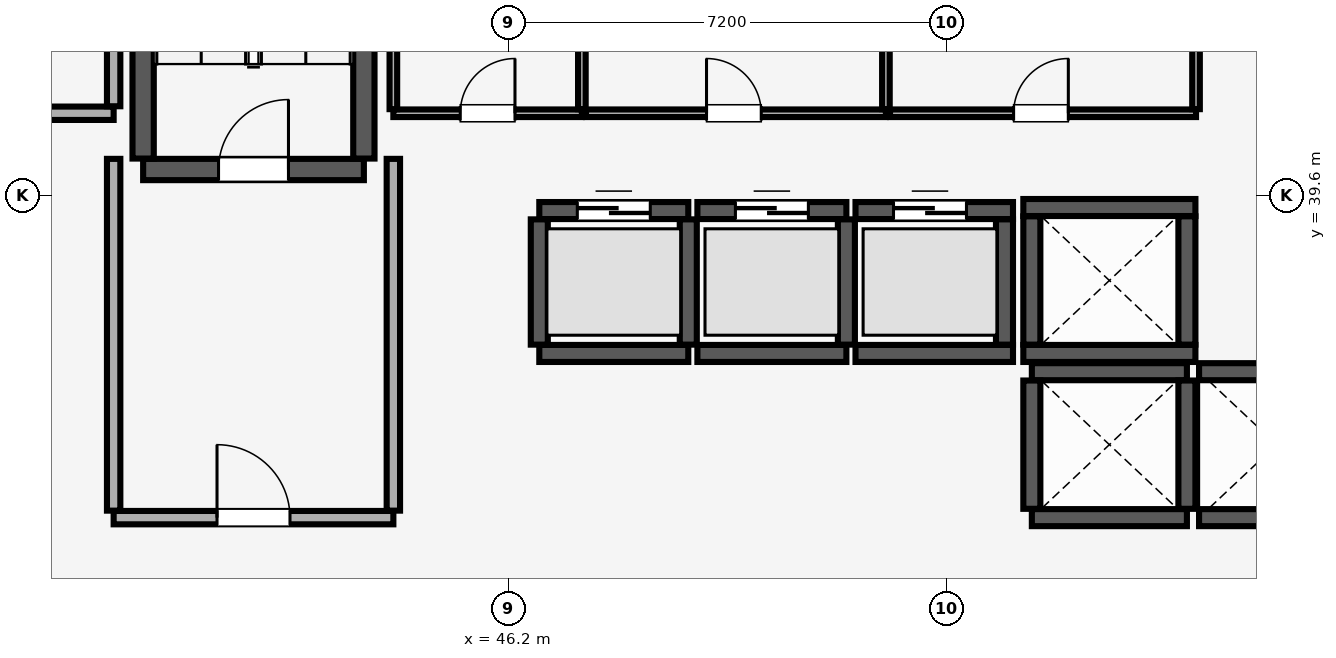
"""IFC4 building model, lengths in metres.
Left out: names, types, materials, properties, quantities, classifications, styles, units other than length and angle.
Written with IfcOpenShell. Run it as: python <this file> out.ifc"""

import sys

from ifc_helpers import new_model, si_unit, direction, frame, frame_2d, origin, place, context, subcontext, project, spatial, rectangle, extrude, element, fill, save


model = new_model("IFC4")
c1 = context("Model", 3, precision=1e-05, world=origin(), true_north=direction((0.0, 1.0)))
c2 = subcontext(c1, "Body", "Model", "MODEL_VIEW")
j1 = project(units=[si_unit("LENGTHUNIT", "METRE"), si_unit("PLANEANGLEUNIT", "RADIAN")], contexts=[c1])
p1 = place(None, origin())
s1 = spatial("IfcSite", under=j1, at=p1, CompositionType="ELEMENT")
p2 = place(p1, origin())
s2 = spatial("IfcBuilding", under=s1, at=p2, CompositionType="ELEMENT")
p3 = place(p2, frame((0.0, 0.0, 8.0)))
s3 = spatial("IfcBuildingStorey", under=s2, at=p3, CompositionType="ELEMENT", Elevation=8.0)
p4 = place(p3, frame((40.185, 40.025, 0.0), z_axis=(0.0, 0.0, 1.0), x_axis=(1.0, 0.0, 0.0)))
e1 = element("IfcWall", 1, at=p4, inside=s3, PredefinedType="SHEAR", context=c2, shape_type="SweptSolid", body=[
    extrude(rectangle(XDim=3.63, YDim=0.35, at=frame_2d((1.815, 0.0))), origin(), (0.0, 0.0, 1.0), 5.68),
])
p5 = place(p4, frame((1.24, 0.0, 0.0)))
e2 = element("IfcOpeningElement", 2, at=p5, cuts=e1, PredefinedType="OPENING", context=c2, shape_type="SweptSolid", body=[
    extrude(rectangle(XDim=1.15, YDim=2.15, at=frame_2d((0.575, 1.075))), frame((0.0, 0.185, 0.0), z_axis=(0.0, -1.0, 0.0), x_axis=(1.0, 0.0, 0.0)), (0.0, 0.0, 1.0), 0.37),
])
for number, where, z_axis, x_axis in (
    (3, (40.185, 40.205, 0.0), (0.0, 0.0, 1.0), (0.0, 1.0, 0.0)),
    (4, (43.815, 40.205, 0.0), (0.0, 0.0, 1.0), (0.0, 1.0, 0.0)),
):
    element("IfcWall", number, at=place(p3, frame(where, z_axis=z_axis, x_axis=x_axis)), inside=s3, PredefinedType="SHEAR", context=c2, shape_type="SweptSolid", body=[
        extrude(rectangle(XDim=8.09, YDim=0.35, at=frame_2d((4.045, 0.0))), origin(), (0.0, 0.0, 1.0), 5.68),
    ])
p6 = place(p3, frame((46.7, 37.0, 0.0), z_axis=(0.0, 0.0, 1.0), x_axis=(1.0, 0.0, 0.0)))
e5 = element("IfcWall", 5, at=p6, inside=s3, PredefinedType="SHEAR", context=c2, shape_type="SweptSolid", body=[
    extrude(rectangle(XDim=2.45, YDim=0.28, at=frame_2d((1.225, 0.0))), origin(), (0.0, 0.0, 1.0), 5.68),
])
p7 = place(p3, frame((46.7, 39.35, 0.0), z_axis=(0.0, 0.0, 1.0), x_axis=(1.0, 0.0, 0.0)))
e6 = element("IfcWall", 6, at=p7, inside=s3, PredefinedType="SHEAR", context=c2, shape_type="SweptSolid", body=[
    extrude(rectangle(XDim=2.45, YDim=0.28, at=frame_2d((1.225, 0.0))), origin(), (0.0, 0.0, 1.0), 5.68),
])
p8 = place(p7, frame((0.625, 0.0, 0.0)))
e7 = element("IfcOpeningElement", 7, at=p8, cuts=e6, PredefinedType="OPENING", context=c2, shape_type="SweptSolid", body=[
    extrude(rectangle(XDim=1.2, YDim=2.25, at=frame_2d((0.6, 1.125))), frame((0.0, 0.15, 0.0), z_axis=(0.0, -1.0, 0.0), x_axis=(1.0, 0.0, 0.0)), (0.0, 0.0, 1.0), 0.3),
])
for number, where, z_axis, x_axis in (
    (8, (46.7, 37.145, 0.0), (0.0, 0.0, 1.0), (0.0, 1.0, 0.0)),
    (9, (49.15, 37.145, 0.0), (0.0, 0.0, 1.0), (0.0, 1.0, 0.0)),
):
    element("IfcWall", number, at=place(p3, frame(where, z_axis=z_axis, x_axis=x_axis)), inside=s3, PredefinedType="SHEAR", context=c2, shape_type="SweptSolid", body=[
        extrude(rectangle(XDim=2.06, YDim=0.28, at=frame_2d((1.03, 0.0))), origin(), (0.0, 0.0, 1.0), 5.68),
    ])
p9 = place(p3, frame((49.3, 37.0, 0.0), z_axis=(0.0, 0.0, 1.0), x_axis=(1.0, 0.0, 0.0)))
e10 = element("IfcWall", 10, at=p9, inside=s3, PredefinedType="SHEAR", context=c2, shape_type="SweptSolid", body=[
    extrude(rectangle(XDim=2.45, YDim=0.28, at=frame_2d((1.225, 0.0))), origin(), (0.0, 0.0, 1.0), 5.68),
])
p10 = place(p3, frame((49.3, 39.35, 0.0), z_axis=(0.0, 0.0, 1.0), x_axis=(1.0, 0.0, 0.0)))
e11 = element("IfcWall", 11, at=p10, inside=s3, PredefinedType="SHEAR", context=c2, shape_type="SweptSolid", body=[
    extrude(rectangle(XDim=2.45, YDim=0.28, at=frame_2d((1.225, 0.0))), origin(), (0.0, 0.0, 1.0), 5.68),
])
p11 = place(p10, frame((0.625, 0.0, 0.0)))
e12 = element("IfcOpeningElement", 12, at=p11, cuts=e11, PredefinedType="OPENING", context=c2, shape_type="SweptSolid", body=[
    extrude(rectangle(XDim=1.2, YDim=2.25, at=frame_2d((0.6, 1.125))), frame((0.0, 0.15, 0.0), z_axis=(0.0, -1.0, 0.0), x_axis=(1.0, 0.0, 0.0)), (0.0, 0.0, 1.0), 0.3),
])
p12 = place(p3, frame((51.75, 37.145, 0.0), z_axis=(0.0, 0.0, 1.0), x_axis=(0.0, 1.0, 0.0)))
e13 = element("IfcWall", 13, at=p12, inside=s3, PredefinedType="SHEAR", context=c2, shape_type="SweptSolid", body=[
    extrude(rectangle(XDim=2.06, YDim=0.28, at=frame_2d((1.03, 0.0))), origin(), (0.0, 0.0, 1.0), 5.68),
])
p13 = place(p3, frame((51.9, 37.0, 0.0), z_axis=(0.0, 0.0, 1.0), x_axis=(1.0, 0.0, 0.0)))
e14 = element("IfcWall", 14, at=p13, inside=s3, PredefinedType="SHEAR", context=c2, shape_type="SweptSolid", body=[
    extrude(rectangle(XDim=2.59, YDim=0.28, at=frame_2d((1.295, 0.0))), origin(), (0.0, 0.0, 1.0), 5.68),
])
p14 = place(p3, frame((51.9, 39.35, 0.0), z_axis=(0.0, 0.0, 1.0), x_axis=(1.0, 0.0, 0.0)))
e15 = element("IfcWall", 15, at=p14, inside=s3, PredefinedType="SHEAR", context=c2, shape_type="SweptSolid", body=[
    extrude(rectangle(XDim=2.59, YDim=0.28, at=frame_2d((1.295, 0.0))), origin(), (0.0, 0.0, 1.0), 5.68),
])
p15 = place(p14, frame((0.625, 0.0, 0.0)))
e16 = element("IfcOpeningElement", 16, at=p15, cuts=e15, PredefinedType="OPENING", context=c2, shape_type="SweptSolid", body=[
    extrude(rectangle(XDim=1.2, YDim=2.25, at=frame_2d((0.6, 1.125))), frame((0.0, 0.15, 0.0), z_axis=(0.0, -1.0, 0.0), x_axis=(1.0, 0.0, 0.0)), (0.0, 0.0, 1.0), 0.3),
])
p16 = place(p3, frame((54.35, 37.145, 0.0), z_axis=(0.0, 0.0, 1.0), x_axis=(0.0, 1.0, 0.0)))
e17 = element("IfcWall", 17, at=p16, inside=s3, PredefinedType="SHEAR", context=c2, shape_type="SweptSolid", body=[
    extrude(rectangle(XDim=2.06, YDim=0.28, at=frame_2d((1.03, 0.0))), origin(), (0.0, 0.0, 1.0), 5.68),
])
for number, where, z_axis, x_axis in (
    (18, (54.8, 34.3, 0.0), (0.0, 0.0, 1.0), (1.0, 0.0, 0.0)),
    (19, (54.8, 36.7, 0.0), (0.0, 0.0, 1.0), (1.0, 0.0, 0.0)),
):
    element("IfcWall", number, at=place(p3, frame(where, z_axis=z_axis, x_axis=x_axis)), inside=s3, PredefinedType="SHEAR", context=c2, shape_type="SweptSolid", body=[
        extrude(rectangle(XDim=2.55, YDim=0.28, at=frame_2d((1.275, 0.0))), origin(), (0.0, 0.0, 1.0), 5.68),
    ])
for number, where, z_axis, x_axis in (
    (20, (54.8, 34.445, 0.0), (0.0, 0.0, 1.0), (0.0, 1.0, 0.0)),
    (21, (57.35, 34.445, 0.0), (0.0, 0.0, 1.0), (0.0, 1.0, 0.0)),
):
    element("IfcWall", number, at=place(p3, frame(where, z_axis=z_axis, x_axis=x_axis)), inside=s3, PredefinedType="SHEAR", context=c2, shape_type="SweptSolid", body=[
        extrude(rectangle(XDim=2.11, YDim=0.28, at=frame_2d((1.055, 0.0))), origin(), (0.0, 0.0, 1.0), 5.68),
    ])
for number, where, z_axis, x_axis in (
    (22, (57.55, 34.3, 0.0), (0.0, 0.0, 1.0), (1.0, 0.0, 0.0)),
    (23, (57.55, 36.7, 0.0), (0.0, 0.0, 1.0), (1.0, 0.0, 0.0)),
):
    element("IfcWall", number, at=place(p3, frame(where, z_axis=z_axis, x_axis=x_axis)), inside=s3, PredefinedType="SHEAR", context=c2, shape_type="SweptSolid", body=[
        extrude(rectangle(XDim=2.55, YDim=0.28, at=frame_2d((1.275, 0.0))), origin(), (0.0, 0.0, 1.0), 5.68),
    ])
for number, where, z_axis, x_axis in (
    (24, (54.66, 37.0, 0.0), (0.0, 0.0, 1.0), (1.0, 0.0, 0.0)),
    (25, (54.66, 39.4, 0.0), (0.0, 0.0, 1.0), (1.0, 0.0, 0.0)),
):
    element("IfcWall", number, at=place(p3, frame(where, z_axis=z_axis, x_axis=x_axis)), inside=s3, PredefinedType="SHEAR", context=c2, shape_type="SweptSolid", body=[
        extrude(rectangle(XDim=2.83, YDim=0.28, at=frame_2d((1.415, 0.0))), origin(), (0.0, 0.0, 1.0), 5.68),
    ])
for number, where, z_axis, x_axis in (
    (26, (54.8, 37.145, 0.0), (0.0, 0.0, 1.0), (0.0, 1.0, 0.0)),
    (27, (57.35, 37.145, 0.0), (0.0, 0.0, 1.0), (0.0, 1.0, 0.0)),
):
    element("IfcWall", number, at=place(p3, frame(where, z_axis=z_axis, x_axis=x_axis)), inside=s3, PredefinedType="SHEAR", context=c2, shape_type="SweptSolid", body=[
        extrude(rectangle(XDim=2.11, YDim=0.28, at=frame_2d((1.055, 0.0))), origin(), (0.0, 0.0, 1.0), 5.68),
    ])
p17 = place(p3, frame((39.7, 34.3, 0.0), z_axis=(0.0, 0.0, 1.0), x_axis=(1.0, 0.0, 0.0)))
e28 = element("IfcWall", 28, at=p17, inside=s3, PredefinedType="PARTITIONING", context=c2, shape_type="SweptSolid", body=[
    extrude(rectangle(XDim=4.6, YDim=0.22, at=frame_2d((2.3, 0.0))), origin(), (0.0, 0.0, 1.0), 5.68),
])
p18 = place(p17, frame((1.7, 0.0, 0.0)))
e29 = element("IfcOpeningElement", 29, at=p18, cuts=e28, PredefinedType="OPENING", context=c2, shape_type="SweptSolid", body=[
    extrude(rectangle(XDim=1.2, YDim=2.15, at=frame_2d((0.6, 1.075))), frame((0.0, 0.12, 0.0), z_axis=(0.0, -1.0, 0.0), x_axis=(1.0, 0.0, 0.0)), (0.0, 0.0, 1.0), 0.24),
])
for number, where, z_axis, x_axis in (
    (30, (39.7, 34.415, 0.0), (0.0, 0.0, 1.0), (0.0, 1.0, 0.0)),
    (31, (44.3, 34.415, 0.0), (0.0, 0.0, 1.0), (0.0, 1.0, 0.0)),
):
    element("IfcWall", number, at=place(p3, frame(where, z_axis=z_axis, x_axis=x_axis)), inside=s3, PredefinedType="PARTITIONING", context=c2, shape_type="SweptSolid", body=[
        extrude(rectangle(XDim=5.785, YDim=0.22, at=frame_2d((2.893, 0.0))), origin(), (0.0, 0.0, 1.0), 5.68),
    ])
p19 = place(p3, frame((35.18, 40.95, 0.0), z_axis=(0.0, 0.0, 1.0), x_axis=(1.0, 0.0, 0.0)))
e32 = element("IfcWall", 32, at=p19, inside=s3, PredefinedType="PARTITIONING", context=c2, shape_type="SweptSolid", body=[
    extrude(rectangle(XDim=4.52, YDim=0.22, at=frame_2d((2.26, 0.0))), origin(), (0.0, 0.0, 1.0), 5.68),
])
p20 = place(p19, frame((0.795, 0.0, 0.0)))
e33 = element("IfcOpeningElement", 33, at=p20, cuts=e32, PredefinedType="OPENING", context=c2, shape_type="SweptSolid", body=[
    extrude(rectangle(XDim=0.85, YDim=2.1, at=frame_2d((0.425, 1.05))), frame((0.0, 0.12, 0.0), z_axis=(0.0, -1.0, 0.0), x_axis=(1.0, 0.0, 0.0)), (0.0, 0.0, 1.0), 0.24),
])
p21 = place(p3, frame((39.7, 41.065, 0.0), z_axis=(0.0, 0.0, 1.0), x_axis=(0.0, 1.0, 0.0)))
e34 = element("IfcWall", 34, at=p21, inside=s3, PredefinedType="PARTITIONING", context=c2, shape_type="SweptSolid", body=[
    extrude(rectangle(XDim=7.12, YDim=0.22, at=frame_2d((3.56, 0.0))), origin(), (0.0, 0.0, 1.0), 5.68),
])
p22 = place(p3, frame((44.3, 40.95, 0.0), z_axis=(0.0, 0.0, 1.0), x_axis=(1.0, 0.0, 0.0)))
e35 = element("IfcWall", 35, at=p22, inside=s3, PredefinedType="PARTITIONING", context=c2, shape_type="SweptSolid", body=[
    extrude(rectangle(XDim=3.1, YDim=0.125, at=frame_2d((1.55, 0.0))), origin(), (0.0, 0.0, 1.0), 5.68),
])
p23 = place(p22, frame((1.1, 0.0, 0.0)))
e36 = element("IfcOpeningElement", 36, at=p23, cuts=e35, PredefinedType="OPENING", context=c2, shape_type="SweptSolid", body=[
    extrude(rectangle(XDim=0.9, YDim=2.1, at=frame_2d((0.45, 1.05))), frame((0.0, 0.073, 0.0), z_axis=(0.0, -1.0, 0.0), x_axis=(1.0, 0.0, 0.0)), (0.0, 0.0, 1.0), 0.145),
])
for number, where, z_axis, x_axis in (
    (37, (44.3, 41.018, 0.0), (0.0, 0.0, 1.0), (0.0, 1.0, 0.0)),
    (38, (47.4, 41.018, 0.0), (0.0, 0.0, 1.0), (0.0, 1.0, 0.0)),
):
    element("IfcWall", number, at=place(p3, frame(where, z_axis=z_axis, x_axis=x_axis)), inside=s3, PredefinedType="PARTITIONING", context=c2, shape_type="SweptSolid", body=[
        extrude(rectangle(XDim=7.215, YDim=0.125, at=frame_2d((3.607, 0.0))), origin(), (0.0, 0.0, 1.0), 5.68),
    ])
p24 = place(p3, frame((47.468, 40.95, 0.0), z_axis=(0.0, 0.0, 1.0), x_axis=(1.0, 0.0, 0.0)))
e39 = element("IfcWall", 39, at=p24, inside=s3, PredefinedType="PARTITIONING", context=c2, shape_type="SweptSolid", body=[
    extrude(rectangle(XDim=4.932, YDim=0.125, at=frame_2d((2.466, 0.0))), origin(), (0.0, 0.0, 1.0), 5.68),
])
p25 = place(p24, frame((1.982, 0.0, 0.0)))
e40 = element("IfcOpeningElement", 40, at=p25, cuts=e39, PredefinedType="OPENING", context=c2, shape_type="SweptSolid", body=[
    extrude(rectangle(XDim=0.9, YDim=2.1, at=frame_2d((0.45, 1.05))), frame((0.0, 0.073, 0.0), z_axis=(0.0, -1.0, 0.0), x_axis=(1.0, 0.0, 0.0)), (0.0, 0.0, 1.0), 0.145),
])
p26 = place(p3, frame((52.4, 41.018, 0.0), z_axis=(0.0, 0.0, 1.0), x_axis=(0.0, 1.0, 0.0)))
e41 = element("IfcWall", 41, at=p26, inside=s3, PredefinedType="PARTITIONING", context=c2, shape_type="SweptSolid", body=[
    extrude(rectangle(XDim=7.215, YDim=0.125, at=frame_2d((3.607, 0.0))), origin(), (0.0, 0.0, 1.0), 5.68),
])
p27 = place(p3, frame((52.468, 40.95, 0.0), z_axis=(0.0, 0.0, 1.0), x_axis=(1.0, 0.0, 0.0)))
e42 = element("IfcWall", 42, at=p27, inside=s3, PredefinedType="PARTITIONING", context=c2, shape_type="SweptSolid", body=[
    extrude(rectangle(XDim=5.032, YDim=0.125, at=frame_2d((2.516, 0.0))), origin(), (0.0, 0.0, 1.0), 5.68),
])
p28 = place(p27, frame((2.032, 0.0, 0.0)))
e43 = element("IfcOpeningElement", 43, at=p28, cuts=e42, PredefinedType="OPENING", context=c2, shape_type="SweptSolid", body=[
    extrude(rectangle(XDim=0.9, YDim=2.1, at=frame_2d((0.45, 1.05))), frame((0.0, 0.073, 0.0), z_axis=(0.0, -1.0, 0.0), x_axis=(1.0, 0.0, 0.0)), (0.0, 0.0, 1.0), 0.145),
])
p29 = place(p3, frame((57.5, 41.018, 0.0), z_axis=(0.0, 0.0, 1.0), x_axis=(0.0, 1.0, 0.0)))
e44 = element("IfcWall", 44, at=p29, inside=s3, PredefinedType="PARTITIONING", context=c2, shape_type="SweptSolid", body=[
    extrude(rectangle(XDim=2.167, YDim=0.125, at=frame_2d((1.084, 0.0))), origin(), (0.0, 0.0, 1.0), 5.68),
])
p30 = place(p5, origin())
e45 = element("IfcDoor", 45, at=p30, inside=s3, OperationType="SINGLE_SWING_RIGHT", PredefinedType="DOOR", context=c2, shape_type="SweptSolid", body=[
    extrude(rectangle(XDim=1.15, YDim=2.15, at=frame_2d((0.575, 1.075))), frame((0.0, 0.025, 0.0), z_axis=(0.0, -1.0, 0.0), x_axis=(1.0, 0.0, 0.0)), (0.0, 0.0, 1.0), 0.05),
])
fill(e2, e45)
p31 = place(p8, origin())
e46 = element("IfcDoor", 46, at=p31, inside=s3, OperationType="DOUBLE_DOOR_SLIDING", PredefinedType="DOOR", context=c2, shape_type="SweptSolid", body=[
    extrude(rectangle(XDim=1.2, YDim=2.25, at=frame_2d((0.6, 1.125))), frame((0.0, 0.025, 0.0), z_axis=(0.0, -1.0, 0.0), x_axis=(1.0, 0.0, 0.0)), (0.0, 0.0, 1.0), 0.05),
])
fill(e7, e46)
p32 = place(p11, origin())
e47 = element("IfcDoor", 47, at=p32, inside=s3, OperationType="DOUBLE_DOOR_SLIDING", PredefinedType="DOOR", context=c2, shape_type="SweptSolid", body=[
    extrude(rectangle(XDim=1.2, YDim=2.25, at=frame_2d((0.6, 1.125))), frame((0.0, 0.025, 0.0), z_axis=(0.0, -1.0, 0.0), x_axis=(1.0, 0.0, 0.0)), (0.0, 0.0, 1.0), 0.05),
])
fill(e12, e47)
p33 = place(p15, origin())
e48 = element("IfcDoor", 48, at=p33, inside=s3, OperationType="DOUBLE_DOOR_SLIDING", PredefinedType="DOOR", context=c2, shape_type="SweptSolid", body=[
    extrude(rectangle(XDim=1.2, YDim=2.25, at=frame_2d((0.6, 1.125))), frame((0.0, 0.025, 0.0), z_axis=(0.0, -1.0, 0.0), x_axis=(1.0, 0.0, 0.0)), (0.0, 0.0, 1.0), 0.05),
])
fill(e16, e48)
p34 = place(p18, origin())
e49 = element("IfcDoor", 49, at=p34, inside=s3, OperationType="SINGLE_SWING_LEFT", PredefinedType="DOOR", context=c2, shape_type="SweptSolid", body=[
    extrude(rectangle(XDim=1.2, YDim=2.15, at=frame_2d((0.6, 1.075))), frame((0.0, 0.025, 0.0), z_axis=(0.0, -1.0, 0.0), x_axis=(1.0, 0.0, 0.0)), (0.0, 0.0, 1.0), 0.05),
])
fill(e29, e49)
p35 = place(p23, origin())
e50 = element("IfcDoor", 50, at=p35, inside=s3, OperationType="SINGLE_SWING_RIGHT", PredefinedType="DOOR", context=c2, shape_type="SweptSolid", body=[
    extrude(rectangle(XDim=0.9, YDim=2.1, at=frame_2d((0.45, 1.05))), frame((0.0, 0.025, 0.0), z_axis=(0.0, -1.0, 0.0), x_axis=(1.0, 0.0, 0.0)), (0.0, 0.0, 1.0), 0.05),
])
fill(e36, e50)
p36 = place(p25, origin())
e51 = element("IfcDoor", 51, at=p36, inside=s3, OperationType="SINGLE_SWING_LEFT", PredefinedType="DOOR", context=c2, shape_type="SweptSolid", body=[
    extrude(rectangle(XDim=0.9, YDim=2.1, at=frame_2d((0.45, 1.05))), frame((0.0, 0.025, 0.0), z_axis=(0.0, -1.0, 0.0), x_axis=(1.0, 0.0, 0.0)), (0.0, 0.0, 1.0), 0.05),
])
fill(e40, e51)
p37 = place(p28, origin())
e52 = element("IfcDoor", 52, at=p37, inside=s3, OperationType="SINGLE_SWING_RIGHT", PredefinedType="DOOR", context=c2, shape_type="SweptSolid", body=[
    extrude(rectangle(XDim=0.9, YDim=2.1, at=frame_2d((0.45, 1.05))), frame((0.0, 0.025, 0.0), z_axis=(0.0, -1.0, 0.0), x_axis=(1.0, 0.0, 0.0)), (0.0, 0.0, 1.0), 0.05),
])
fill(e43, e52)
save(model, sys.argv[1])
